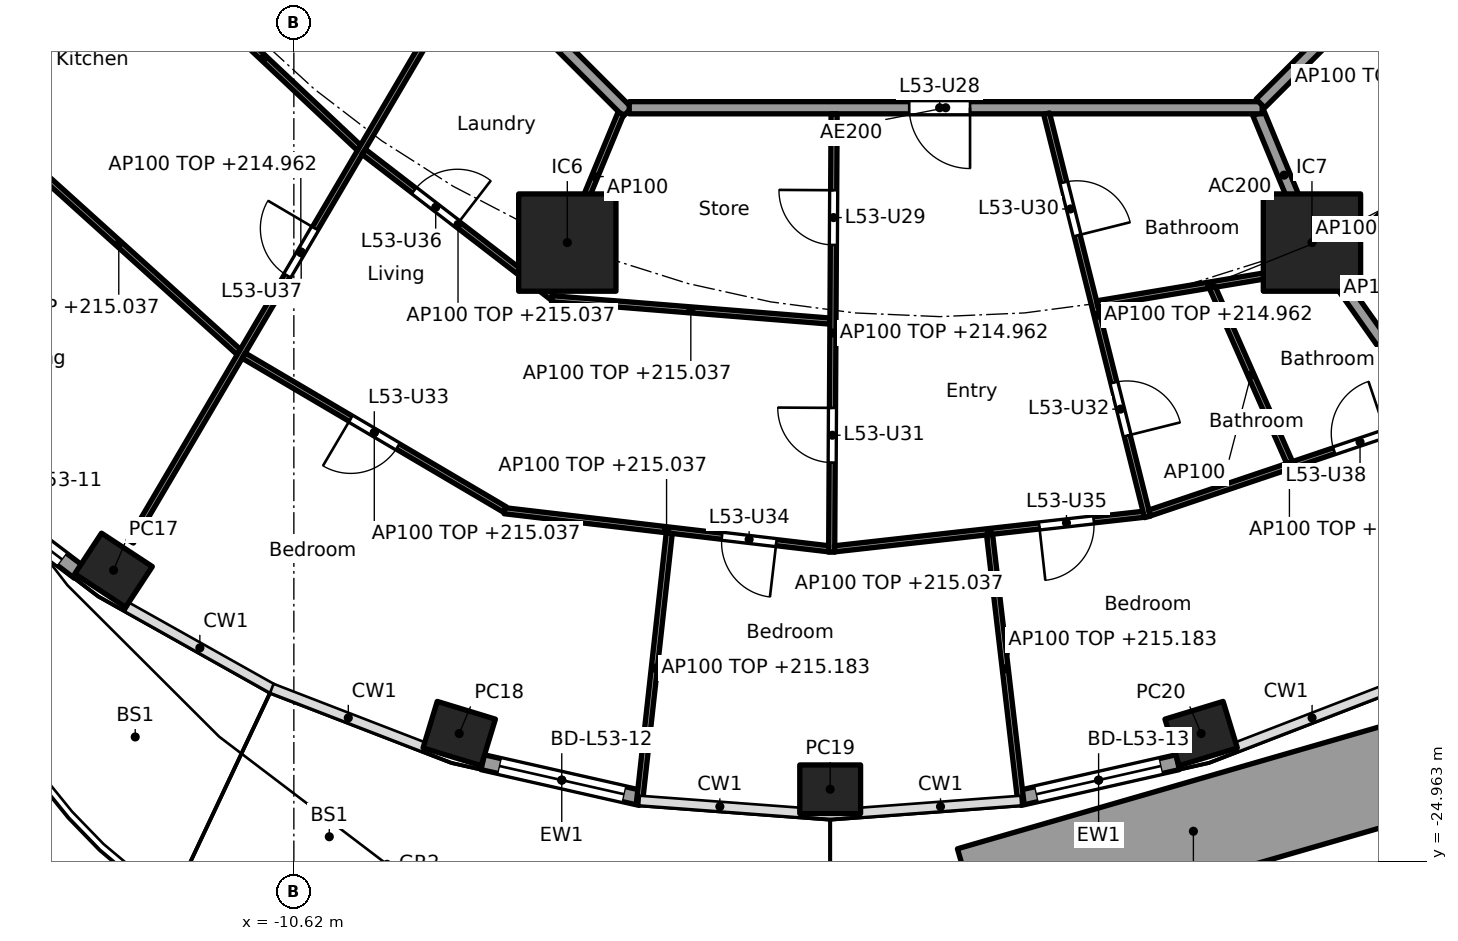
"""IFC4 building model, lengths in metres.
Left out: names, types, materials, properties, quantities, classifications, styles, units other than length and angle.
Written with IfcOpenShell. Run it as: python <this file> out.ifc"""

import sys

from ifc_helpers import new_model, si_unit, direction, frame, frame_2d, origin, origin_2d, place, context, subcontext, project, spatial, rectangle, hollow_rectangle, extrude, element, fill, save


model = new_model("IFC4")
c1 = context("Model", 3, precision=1e-05, world=origin(), true_north=direction((0.0, 1.0)))
c2 = subcontext(c1, "Body", "Model", "MODEL_VIEW")
j1 = project(units=[si_unit("LENGTHUNIT", "METRE"), si_unit("PLANEANGLEUNIT", "RADIAN")], contexts=[c1])
p1 = place(None, origin())
s1 = spatial("IfcSite", under=j1, at=p1, CompositionType="ELEMENT")
p2 = place(p1, origin())
s2 = spatial("IfcBuilding", under=s1, at=p2, CompositionType="ELEMENT")
p3 = place(p2, frame((0.0, 0.0, 212.2)))
s3 = spatial("IfcBuildingStorey", under=s2, at=p3, CompositionType="ELEMENT", Elevation=212.2)
for number, where, z_axis, x_axis in (
    (1, (-13.585, -20.17, -0.26), (0.0, 0.0, 1.0), (0.836, -0.549, 0.0)),
    (2, (-7.9, -22.856, -0.26), (0.0, 0.0, 1.0), (0.957, -0.292, 0.0)),
    (3, (-1.8, -23.772, -0.26), (0.0, 0.0, 1.0), (1.0, 0.0, 0.0)),
    (4, (4.3, -22.856, -0.26), (0.0, 0.0, 1.0), (0.957, 0.292, 0.0)),
):
    element("IfcColumn", number, at=place(p3, frame(where, z_axis=z_axis, x_axis=x_axis)), inside=s3, PredefinedType="COLUMN", context=c2, shape_type="SweptSolid", body=[
        extrude(hollow_rectangle(XDim=1.0, YDim=0.8, WallThickness=0.032, at=origin_2d()), origin(), (0.0, 0.0, 1.0), 3.96),
    ])
for number, where, z_axis, x_axis in (
    (5, (-6.123, -14.782, 0.0), (0.0, 0.0, 1.0), (1.0, 0.0, 0.0)),
    (6, (6.123, -14.782, 0.0), (0.0, 0.0, 1.0), (1.0, 0.0, 0.0)),
):
    element("IfcColumn", number, at=place(p3, frame(where, z_axis=z_axis, x_axis=x_axis)), inside=s3, PredefinedType="COLUMN", context=c2, shape_type="SweptSolid", body=[
        extrude(rectangle(XDim=1.6, YDim=1.6, at=origin_2d()), origin(), (0.0, 0.0, 1.0), 3.7),
    ])
p4 = place(p3, frame((-14.157, -20.201, 0.0), z_axis=(0.0, 0.0, 1.0), x_axis=(-0.795990084031, 0.60530966135, 0.0)))
e7 = element("IfcWall", 7, at=p4, inside=s3, PredefinedType="SOLIDWALL", context=c2, shape_type="SweptSolid", body=[
    extrude(rectangle(XDim=2.789, YDim=0.25, at=frame_2d((1.394, 0.0))), origin(), (0.0, 0.0, 1.0), 3.44),
])
p5 = place(p4, frame((0.344, 0.0, 0.0)))
e8 = element("IfcOpeningElement", 8, at=p5, cuts=e7, PredefinedType="OPENING", context=c2, shape_type="SweptSolid", body=[
    extrude(rectangle(XDim=2.1, YDim=2.4, at=frame_2d((1.05, 1.2))), frame((0.0, 0.135, 0.0), z_axis=(0.0, -1.0, 0.0), x_axis=(1.0, 0.0, 0.0)), (0.0, 0.0, 1.0), 0.27),
])
p6 = place(p3, frame((-4.914, -23.916, 0.0), z_axis=(0.0, 0.0, 1.0), x_axis=(-0.975324089124, 0.220777990694, 0.0)))
e9 = element("IfcWall", 9, at=p6, inside=s3, PredefinedType="SOLIDWALL", context=c2, shape_type="SweptSolid", body=[
    extrude(rectangle(XDim=2.666, YDim=0.25, at=frame_2d((1.333, 0.0))), origin(), (0.0, 0.0, 1.0), 3.44),
])
p7 = place(p6, frame((0.283, 0.0, 0.0)))
e10 = element("IfcOpeningElement", 10, at=p7, cuts=e9, PredefinedType="OPENING", context=c2, shape_type="SweptSolid", body=[
    extrude(rectangle(XDim=2.1, YDim=2.4, at=frame_2d((1.05, 1.2))), frame((0.0, 0.135, 0.0), z_axis=(0.0, -1.0, 0.0), x_axis=(1.0, 0.0, 0.0)), (0.0, 0.0, 1.0), 0.27),
])
p8 = place(p3, frame((3.915, -23.327, 0.0), z_axis=(0.0, 0.0, 1.0), x_axis=(-0.975324089124, -0.220777990694, 0.0)))
e11 = element("IfcWall", 11, at=p8, inside=s3, PredefinedType="SOLIDWALL", context=c2, shape_type="SweptSolid", body=[
    extrude(rectangle(XDim=2.666, YDim=0.25, at=frame_2d((1.333, 0.0))), origin(), (0.0, 0.0, 1.0), 3.44),
])
p9 = place(p8, frame((0.283, 0.0, 0.0)))
e12 = element("IfcOpeningElement", 12, at=p9, cuts=e11, PredefinedType="OPENING", context=c2, shape_type="SweptSolid", body=[
    extrude(rectangle(XDim=2.1, YDim=2.4, at=frame_2d((1.05, 1.2))), frame((0.0, 0.135, 0.0), z_axis=(0.0, -1.0, 0.0), x_axis=(1.0, 0.0, 0.0)), (0.0, 0.0, 1.0), 0.27),
])
p10 = place(p3, frame((0.515, -25.52, 0.0), z_axis=(0.0, 0.0, 1.0), x_axis=(0.960695754533, 0.277603435177, 0.0)))
e13 = element("IfcWall", 13, at=p10, inside=s3, PredefinedType="SOLIDWALL", context=c2, shape_type="SweptSolid", body=[
    extrude(rectangle(XDim=7.615, YDim=1.6, at=frame_2d((3.808, 0.0))), origin(), (0.0, 0.0, 1.0), 1.1),
])
p11 = place(p3, frame((12.567, -25.541, 0.0), z_axis=(0.0, 0.0, 1.0), x_axis=(-0.975296134704, -0.22090144778, 0.0)))
e14 = element("IfcWall", 14, at=p11, inside=s3, PredefinedType="SOLIDWALL", context=c2, shape_type="SweptSolid", body=[
    extrude(rectangle(XDim=9.019, YDim=1.6, at=frame_2d((4.509, 0.0))), origin(), (0.0, 0.0, 1.0), 1.1),
])
p12 = place(p3, frame((5.243, -12.657, 0.0), z_axis=(0.0, 0.0, 1.0), x_axis=(0.382691608661, -0.923876145736, 0.0)))
e15 = element("IfcWall", 15, at=p12, inside=s3, PredefinedType="PARTITIONING", context=c2, shape_type="SweptSolid", body=[
    extrude(rectangle(XDim=2.2, YDim=0.2, at=frame_2d((1.1, 0.0))), origin(), (0.0, 0.0, 1.0), 3.44),
])
p13 = place(p3, frame((6.152, -14.823, 0.0), z_axis=(0.0, 0.0, 1.0), x_axis=(0.576994695158, -0.816747893637, 0.0)))
e16 = element("IfcWall", 16, at=p13, inside=s3, PredefinedType="PARTITIONING", context=c2, shape_type="SweptSolid", body=[
    extrude(rectangle(XDim=6.03, YDim=0.2, at=frame_2d((3.015, 0.0))), origin(), (0.0, 0.0, 1.0), 2.837),
])
p14 = place(p3, frame((-12.635, -5.134, 0.0), z_axis=(0.0, 0.0, 1.0), x_axis=(0.707106781187, -0.707106781187, 0.0)))
e17 = element("IfcWall", 17, at=p14, inside=s3, PredefinedType="PARTITIONING", context=c2, shape_type="SweptSolid", body=[
    extrude(rectangle(XDim=10.609, YDim=0.2, at=frame_2d((5.305, 0.0))), origin(), (0.0, 0.0, 1.0), 3.44),
])
p15 = place(p3, frame((-5.104, -12.565, 0.0), z_axis=(0.0, 0.0, 1.0), x_axis=(1.0, 0.0, 0.0)))
e18 = element("IfcWall", 18, at=p15, inside=s3, PredefinedType="PARTITIONING", context=c2, shape_type="SweptSolid", body=[
    extrude(rectangle(XDim=10.409, YDim=0.2, at=frame_2d((5.205, 0.0))), origin(), (0.0, 0.0, 1.0), 3.44),
])
p16 = place(p15, frame((4.604, 0.0, 0.0)))
e19 = element("IfcOpeningElement", 19, at=p16, cuts=e18, PredefinedType="OPENING", context=c2, shape_type="SweptSolid", body=[
    extrude(rectangle(XDim=1.0, YDim=2.1, at=frame_2d((0.5, 1.05))), frame((0.0, 0.11, 0.0), z_axis=(0.0, -1.0, 0.0), x_axis=(1.0, 0.0, 0.0)), (0.0, 0.0, 1.0), 0.22),
])
p17 = place(p3, frame((5.275, -12.494, 0.0), z_axis=(0.0, 0.0, 1.0), x_axis=(0.707106781187, 0.707106781187, 0.0)))
e20 = element("IfcWall", 20, at=p17, inside=s3, PredefinedType="PARTITIONING", context=c2, shape_type="SweptSolid", body=[
    extrude(rectangle(XDim=10.409, YDim=0.2, at=frame_2d((5.205, 0.0))), origin(), (0.0, 0.0, 1.0), 3.44),
])
p18 = place(p3, frame((-12.688, -10.27, 0.0), z_axis=(0.0, 0.0, 1.0), x_axis=(0.728268142903, -0.685292282192, 0.0)))
e21 = element("IfcWall", 21, at=p18, inside=s3, PredefinedType="PARTITIONING", context=c2, shape_type="SweptSolid", body=[
    extrude(rectangle(XDim=4.312, YDim=0.1, at=frame_2d((2.156, 0.0))), origin(), (0.0, 0.0, 1.0), 2.837),
])
p19 = place(p3, frame((-15.474, -13.019, 0.0), z_axis=(0.0, 0.0, 1.0), x_axis=(0.742348572616, -0.670013878017, 0.0)))
e22 = element("IfcWall", 22, at=p19, inside=s3, PredefinedType="PARTITIONING", context=c2, shape_type="SweptSolid", body=[
    extrude(rectangle(XDim=5.319, YDim=0.1, at=frame_2d((2.66, 0.0))), origin(), (0.0, 0.0, 1.0), 2.837),
])
p20 = place(p3, frame((-7.709, -10.198, 0.0), z_axis=(0.0, 0.0, 1.0), x_axis=(-0.507355901053, -0.8617366127, 0.0)))
e23 = element("IfcWall", 23, at=p20, inside=s3, PredefinedType="PARTITIONING", context=c2, shape_type="SweptSolid", body=[
    extrude(rectangle(XDim=11.025, YDim=0.1, at=frame_2d((5.512, 0.0))), origin(), (0.0, 0.0, 1.0), 2.762),
])
p21 = place(p20, frame((5.05, 0.0, 0.0)))
e24 = element("IfcOpeningElement", 24, at=p21, cuts=e23, PredefinedType="OPENING", context=c2, shape_type="SweptSolid", body=[
    extrude(rectangle(XDim=0.9, YDim=2.1, at=frame_2d((0.45, 1.05))), frame((0.0, 0.06, 0.0), z_axis=(0.0, -1.0, 0.0), x_axis=(1.0, 0.0, 0.0)), (0.0, 0.0, 1.0), 0.12),
])
p22 = place(p3, frame((-9.471, -13.289, 0.0), z_axis=(0.0, 0.0, 1.0), x_axis=(0.7922205419, -0.61023488346, 0.0)))
e25 = element("IfcWall", 25, at=p22, inside=s3, PredefinedType="PARTITIONING", context=c2, shape_type="SweptSolid", body=[
    extrude(rectangle(XDim=3.916, YDim=0.1, at=frame_2d((1.958, 0.0))), origin(), (0.0, 0.0, 1.0), 2.837),
])
p23 = place(p22, frame((1.045, 0.0, 0.0)))
e26 = element("IfcOpeningElement", 26, at=p23, cuts=e25, PredefinedType="OPENING", context=c2, shape_type="SweptSolid", body=[
    extrude(rectangle(XDim=0.9, YDim=2.1, at=frame_2d((0.45, 1.05))), frame((0.0, 0.06, 0.0), z_axis=(0.0, -1.0, 0.0), x_axis=(1.0, 0.0, 0.0)), (0.0, 0.0, 1.0), 0.12),
])
p24 = place(p3, frame((-11.445, -16.641, 0.0), z_axis=(0.0, 0.0, 1.0), x_axis=(0.861562560957, -0.507651409489, 0.0)))
e27 = element("IfcWall", 27, at=p24, inside=s3, PredefinedType="PARTITIONING", context=c2, shape_type="SweptSolid", body=[
    extrude(rectangle(XDim=4.985, YDim=0.1, at=frame_2d((2.492, 0.0))), origin(), (0.0, 0.0, 1.0), 2.837),
])
p25 = place(p24, frame((2.042, 0.0, 0.0)))
e28 = element("IfcOpeningElement", 28, at=p25, cuts=e27, PredefinedType="OPENING", context=c2, shape_type="SweptSolid", body=[
    extrude(rectangle(XDim=0.9, YDim=2.1, at=frame_2d((0.45, 1.05))), frame((0.0, 0.06, 0.0), z_axis=(0.0, -1.0, 0.0), x_axis=(1.0, 0.0, 0.0)), (0.0, 0.0, 1.0), 0.12),
])
p26 = place(p3, frame((-5.243, -12.657, 0.0), z_axis=(0.0, 0.0, 1.0), x_axis=(-0.382719158442, -0.923864733477, 0.0)))
e29 = element("IfcWall", 29, at=p26, inside=s3, PredefinedType="PARTITIONING", context=c2, shape_type="SweptSolid", body=[
    extrude(rectangle(XDim=2.25, YDim=0.1, at=frame_2d((1.125, 0.0))), origin(), (0.0, 0.0, 1.0), 3.44),
])
p27 = place(p3, frame((-6.379, -15.705, 0.0), z_axis=(0.0, 0.0, 1.0), x_axis=(0.996786462227, -0.080104611105, 0.0)))
e30 = element("IfcWall", 30, at=p27, inside=s3, PredefinedType="PARTITIONING", context=c2, shape_type="SweptSolid", body=[
    extrude(rectangle(XDim=4.59, YDim=0.1, at=frame_2d((2.295, 0.0))), origin(), (0.0, 0.0, 1.0), 2.837),
])
p28 = place(p3, frame((-7.156, -19.191, 0.0), z_axis=(0.0, 0.0, 1.0), x_axis=(0.993172627718, -0.116653896424, 0.0)))
e31 = element("IfcWall", 31, at=p28, inside=s3, PredefinedType="PARTITIONING", context=c2, shape_type="SweptSolid", body=[
    extrude(rectangle(XDim=5.368, YDim=0.1, at=frame_2d((2.684, 0.0))), origin(), (0.0, 0.0, 1.0), 2.837),
])
p29 = place(p28, frame((3.601, 0.0, 0.0)))
e32 = element("IfcOpeningElement", 32, at=p29, cuts=e31, PredefinedType="OPENING", context=c2, shape_type="SweptSolid", body=[
    extrude(rectangle(XDim=0.9, YDim=2.1, at=frame_2d((0.45, 1.05))), frame((0.0, 0.06, 0.0), z_axis=(0.0, -1.0, 0.0), x_axis=(1.0, 0.0, 0.0)), (0.0, 0.0, 1.0), 0.12),
])
p30 = place(p3, frame((-4.447, -19.56, 0.0), z_axis=(0.0, 0.0, 1.0), x_axis=(-0.109897425445, -0.993942933915, 0.0)))
e33 = element("IfcWall", 33, at=p30, inside=s3, PredefinedType="PARTITIONING", context=c2, shape_type="SweptSolid", body=[
    extrude(rectangle(XDim=4.465, YDim=0.1, at=frame_2d((2.233, 0.0))), origin(), (0.0, 0.0, 1.0), 2.983),
])
p31 = place(p3, frame((-1.735, -12.665, 0.0), z_axis=(0.0, 0.0, 1.0), x_axis=(-0.005554152823, -0.999984575574, 0.0)))
e34 = element("IfcWall", 34, at=p31, inside=s3, PredefinedType="PARTITIONING", context=c2, shape_type="SweptSolid", body=[
    extrude(rectangle(XDim=7.209, YDim=0.1, at=frame_2d((3.604, 0.0))), origin(), (0.0, 0.0, 1.0), 2.762),
])
p32 = place(p31, frame((1.256, 0.0, 0.0)))
e35 = element("IfcOpeningElement", 35, at=p32, cuts=e34, PredefinedType="OPENING", context=c2, shape_type="SweptSolid", body=[
    extrude(rectangle(XDim=0.9, YDim=2.1, at=frame_2d((0.45, 1.05))), frame((0.0, 0.06, 0.0), z_axis=(0.0, -1.0, 0.0), x_axis=(1.0, 0.0, 0.0)), (0.0, 0.0, 1.0), 0.12),
])
p33 = place(p31, frame((4.836, 0.0, 0.0)))
e36 = element("IfcOpeningElement", 36, at=p33, cuts=e34, PredefinedType="OPENING", context=c2, shape_type="SweptSolid", body=[
    extrude(rectangle(XDim=0.9, YDim=2.1, at=frame_2d((0.45, 1.05))), frame((0.0, 0.06, 0.0), z_axis=(0.0, -1.0, 0.0), x_axis=(1.0, 0.0, 0.0)), (0.0, 0.0, 1.0), 0.12),
])
p34 = place(p3, frame((-1.726, -19.818, 0.0), z_axis=(0.0, 0.0, 1.0), x_axis=(0.99381893047, 0.111013212902, 0.0)))
e37 = element("IfcWall", 37, at=p34, inside=s3, PredefinedType="PARTITIONING", context=c2, shape_type="SweptSolid", body=[
    extrude(rectangle(XDim=5.113, YDim=0.1, at=frame_2d((2.557, 0.0))), origin(), (0.0, 0.0, 1.0), 2.837),
])
p35 = place(p34, frame((3.385, 0.0, 0.0)))
e38 = element("IfcOpeningElement", 38, at=p35, cuts=e37, PredefinedType="OPENING", context=c2, shape_type="SweptSolid", body=[
    extrude(rectangle(XDim=0.9, YDim=2.1, at=frame_2d((0.45, 1.05))), frame((0.0, 0.06, 0.0), z_axis=(0.0, -1.0, 0.0), x_axis=(1.0, 0.0, 0.0)), (0.0, 0.0, 1.0), 0.12),
])
p36 = place(p3, frame((0.821, -19.584, 0.0), z_axis=(0.0, 0.0, 1.0), x_axis=(0.116120946841, -0.993235080786, 0.0)))
e39 = element("IfcWall", 39, at=p36, inside=s3, PredefinedType="PARTITIONING", context=c2, shape_type="SweptSolid", body=[
    extrude(rectangle(XDim=4.445, YDim=0.1, at=frame_2d((2.222, 0.0))), origin(), (0.0, 0.0, 1.0), 2.983),
])
p37 = place(p3, frame((1.759, -12.662, 0.0), z_axis=(0.0, 0.0, 1.0), x_axis=(0.242653275363, -0.970113079984, 0.0)))
e40 = element("IfcWall", 40, at=p37, inside=s3, PredefinedType="PARTITIONING", context=c2, shape_type="SweptSolid", body=[
    extrude(rectangle(XDim=6.836, YDim=0.1, at=frame_2d((3.418, 0.0))), origin(), (0.0, 0.0, 1.0), 2.762),
])
p38 = place(p37, frame((1.166, 0.0, 0.0)))
e41 = element("IfcOpeningElement", 41, at=p38, cuts=e40, PredefinedType="OPENING", context=c2, shape_type="SweptSolid", body=[
    extrude(rectangle(XDim=0.9, YDim=2.1, at=frame_2d((0.45, 1.05))), frame((0.0, 0.06, 0.0), z_axis=(0.0, -1.0, 0.0), x_axis=(1.0, 0.0, 0.0)), (0.0, 0.0, 1.0), 0.12),
])
p39 = place(p37, frame((4.559, 0.0, 0.0)))
e42 = element("IfcOpeningElement", 42, at=p39, cuts=e40, PredefinedType="OPENING", context=c2, shape_type="SweptSolid", body=[
    extrude(rectangle(XDim=0.9, YDim=2.1, at=frame_2d((0.45, 1.05))), frame((0.0, 0.06, 0.0), z_axis=(0.0, -1.0, 0.0), x_axis=(1.0, 0.0, 0.0)), (0.0, 0.0, 1.0), 0.12),
])
p40 = place(p3, frame((2.593, -15.789, 0.0), z_axis=(0.0, 0.0, 1.0), x_axis=(0.986385117656, 0.164451815639, 0.0)))
e43 = element("IfcWall", 43, at=p40, inside=s3, PredefinedType="PARTITIONING", context=c2, shape_type="SweptSolid", body=[
    extrude(rectangle(XDim=3.747, YDim=0.1, at=frame_2d((1.874, 0.0))), origin(), (0.0, 0.0, 1.0), 2.837),
])
p41 = place(p3, frame((3.453, -19.229, 0.0), z_axis=(0.0, 0.0, 1.0), x_axis=(0.947565610716, 0.31956128268, 0.0)))
e44 = element("IfcWall", 44, at=p41, inside=s3, PredefinedType="PARTITIONING", context=c2, shape_type="SweptSolid", body=[
    extrude(rectangle(XDim=4.853, YDim=0.1, at=frame_2d((2.426, 0.0))), origin(), (0.0, 0.0, 1.0), 2.837),
])
p42 = place(p41, frame((3.202, 0.0, 0.0)))
e45 = element("IfcOpeningElement", 45, at=p42, cuts=e44, PredefinedType="OPENING", context=c2, shape_type="SweptSolid", body=[
    extrude(rectangle(XDim=0.9, YDim=2.1, at=frame_2d((0.45, 1.05))), frame((0.0, 0.06, 0.0), z_axis=(0.0, -1.0, 0.0), x_axis=(1.0, 0.0, 0.0)), (0.0, 0.0, 1.0), 0.12),
])
p43 = place(p3, frame((4.485, -15.522, 0.0), z_axis=(0.0, 0.0, 1.0), x_axis=(0.40391918208, -0.914794673327, 0.0)))
e46 = element("IfcWall", 46, at=p43, inside=s3, PredefinedType="PARTITIONING", context=c2, shape_type="SweptSolid", body=[
    extrude(rectangle(XDim=3.146, YDim=0.1, at=frame_2d((1.573, 0.0))), origin(), (0.0, 0.0, 1.0), 3.44),
])
p44 = place(p3, frame((6.461, -15.088, 0.0), z_axis=(0.0, 0.0, 1.0), x_axis=(0.73461579427, 0.678483334217, 0.0)))
e47 = element("IfcWall", 47, at=p44, inside=s3, PredefinedType="PARTITIONING", context=c2, shape_type="SweptSolid", body=[
    extrude(rectangle(XDim=5.837, YDim=0.1, at=frame_2d((2.918, 0.0))), origin(), (0.0, 0.0, 1.0), 2.837),
])
p45 = place(p5, origin())
e48 = element("IfcDoor", 48, at=p45, inside=s3, OperationType="SLIDING_TO_LEFT", PredefinedType="DOOR", context=c2, shape_type="SweptSolid", body=[
    extrude(rectangle(XDim=2.1, YDim=2.4, at=frame_2d((1.05, 1.2))), frame((0.0, 0.025, 0.0), z_axis=(0.0, -1.0, 0.0), x_axis=(1.0, 0.0, 0.0)), (0.0, 0.0, 1.0), 0.05),
])
fill(e8, e48)
p46 = place(p7, origin())
e49 = element("IfcDoor", 49, at=p46, inside=s3, OperationType="SLIDING_TO_LEFT", PredefinedType="DOOR", context=c2, shape_type="SweptSolid", body=[
    extrude(rectangle(XDim=2.1, YDim=2.4, at=frame_2d((1.05, 1.2))), frame((0.0, 0.025, 0.0), z_axis=(0.0, -1.0, 0.0), x_axis=(1.0, 0.0, 0.0)), (0.0, 0.0, 1.0), 0.05),
])
fill(e10, e49)
p47 = place(p9, origin())
e50 = element("IfcDoor", 50, at=p47, inside=s3, OperationType="SLIDING_TO_LEFT", PredefinedType="DOOR", context=c2, shape_type="SweptSolid", body=[
    extrude(rectangle(XDim=2.1, YDim=2.4, at=frame_2d((1.05, 1.2))), frame((0.0, 0.025, 0.0), z_axis=(0.0, -1.0, 0.0), x_axis=(1.0, 0.0, 0.0)), (0.0, 0.0, 1.0), 0.05),
])
fill(e12, e50)
p48 = place(p16, frame((1.0, 0.0, 0.0), x_axis=(-1.0, 0.0, 0.0)))
e51 = element("IfcDoor", 51, at=p48, inside=s3, OperationType="SINGLE_SWING_LEFT", PredefinedType="DOOR", context=c2, shape_type="SweptSolid", body=[
    extrude(rectangle(XDim=1.0, YDim=2.1, at=frame_2d((0.5, 1.05))), frame((0.0, 0.025, 0.0), z_axis=(0.0, -1.0, 0.0), x_axis=(1.0, 0.0, 0.0)), (0.0, 0.0, 1.0), 0.05),
])
fill(e19, e51)
p49 = place(p32, frame((0.9, 0.0, 0.0), x_axis=(-1.0, 0.0, 0.0)))
e52 = element("IfcDoor", 52, at=p49, inside=s3, OperationType="SINGLE_SWING_RIGHT", PredefinedType="DOOR", context=c2, shape_type="SweptSolid", body=[
    extrude(rectangle(XDim=0.9, YDim=2.1, at=frame_2d((0.45, 1.05))), frame((0.0, 0.025, 0.0), z_axis=(0.0, -1.0, 0.0), x_axis=(1.0, 0.0, 0.0)), (0.0, 0.0, 1.0), 0.05),
])
fill(e35, e52)
p50 = place(p38, origin())
e53 = element("IfcDoor", 53, at=p50, inside=s3, OperationType="SINGLE_SWING_RIGHT", PredefinedType="DOOR", context=c2, shape_type="SweptSolid", body=[
    extrude(rectangle(XDim=0.9, YDim=2.1, at=frame_2d((0.45, 1.05))), frame((0.0, 0.025, 0.0), z_axis=(0.0, -1.0, 0.0), x_axis=(1.0, 0.0, 0.0)), (0.0, 0.0, 1.0), 0.05),
])
fill(e41, e53)
p51 = place(p33, frame((0.9, 0.0, 0.0), x_axis=(-1.0, 0.0, 0.0)))
e54 = element("IfcDoor", 54, at=p51, inside=s3, OperationType="SINGLE_SWING_RIGHT", PredefinedType="DOOR", context=c2, shape_type="SweptSolid", body=[
    extrude(rectangle(XDim=0.9, YDim=2.1, at=frame_2d((0.45, 1.05))), frame((0.0, 0.025, 0.0), z_axis=(0.0, -1.0, 0.0), x_axis=(1.0, 0.0, 0.0)), (0.0, 0.0, 1.0), 0.05),
])
fill(e36, e54)
p52 = place(p39, origin())
e55 = element("IfcDoor", 55, at=p52, inside=s3, OperationType="SINGLE_SWING_RIGHT", PredefinedType="DOOR", context=c2, shape_type="SweptSolid", body=[
    extrude(rectangle(XDim=0.9, YDim=2.1, at=frame_2d((0.45, 1.05))), frame((0.0, 0.025, 0.0), z_axis=(0.0, -1.0, 0.0), x_axis=(1.0, 0.0, 0.0)), (0.0, 0.0, 1.0), 0.05),
])
fill(e42, e55)
p53 = place(p25, frame((0.9, 0.0, 0.0), x_axis=(-1.0, 0.0, 0.0)))
e56 = element("IfcDoor", 56, at=p53, inside=s3, OperationType="SINGLE_SWING_RIGHT", PredefinedType="DOOR", context=c2, shape_type="SweptSolid", body=[
    extrude(rectangle(XDim=0.9, YDim=2.1, at=frame_2d((0.45, 1.05))), frame((0.0, 0.025, 0.0), z_axis=(0.0, -1.0, 0.0), x_axis=(1.0, 0.0, 0.0)), (0.0, 0.0, 1.0), 0.05),
])
fill(e28, e56)
p54 = place(p29, frame((0.9, 0.0, 0.0), x_axis=(-1.0, 0.0, 0.0)))
e57 = element("IfcDoor", 57, at=p54, inside=s3, OperationType="SINGLE_SWING_LEFT", PredefinedType="DOOR", context=c2, shape_type="SweptSolid", body=[
    extrude(rectangle(XDim=0.9, YDim=2.1, at=frame_2d((0.45, 1.05))), frame((0.0, 0.025, 0.0), z_axis=(0.0, -1.0, 0.0), x_axis=(1.0, 0.0, 0.0)), (0.0, 0.0, 1.0), 0.05),
])
fill(e32, e57)
p55 = place(p35, frame((0.9, 0.0, 0.0), x_axis=(-1.0, 0.0, 0.0)))
e58 = element("IfcDoor", 58, at=p55, inside=s3, OperationType="SINGLE_SWING_RIGHT", PredefinedType="DOOR", context=c2, shape_type="SweptSolid", body=[
    extrude(rectangle(XDim=0.9, YDim=2.1, at=frame_2d((0.45, 1.05))), frame((0.0, 0.025, 0.0), z_axis=(0.0, -1.0, 0.0), x_axis=(1.0, 0.0, 0.0)), (0.0, 0.0, 1.0), 0.05),
])
fill(e38, e58)
p56 = place(p23, origin())
e59 = element("IfcDoor", 59, at=p56, inside=s3, OperationType="SINGLE_SWING_RIGHT", PredefinedType="DOOR", context=c2, shape_type="SweptSolid", body=[
    extrude(rectangle(XDim=0.9, YDim=2.1, at=frame_2d((0.45, 1.05))), frame((0.0, 0.025, 0.0), z_axis=(0.0, -1.0, 0.0), x_axis=(1.0, 0.0, 0.0)), (0.0, 0.0, 1.0), 0.05),
])
fill(e26, e59)
p57 = place(p21, frame((0.9, 0.0, 0.0), x_axis=(-1.0, 0.0, 0.0)))
e60 = element("IfcDoor", 60, at=p57, inside=s3, OperationType="SINGLE_SWING_RIGHT", PredefinedType="DOOR", context=c2, shape_type="SweptSolid", body=[
    extrude(rectangle(XDim=0.9, YDim=2.1, at=frame_2d((0.45, 1.05))), frame((0.0, 0.025, 0.0), z_axis=(0.0, -1.0, 0.0), x_axis=(1.0, 0.0, 0.0)), (0.0, 0.0, 1.0), 0.05),
])
fill(e24, e60)
p58 = place(p42, origin())
e61 = element("IfcDoor", 61, at=p58, inside=s3, OperationType="SINGLE_SWING_RIGHT", PredefinedType="DOOR", context=c2, shape_type="SweptSolid", body=[
    extrude(rectangle(XDim=0.9, YDim=2.1, at=frame_2d((0.45, 1.05))), frame((0.0, 0.025, 0.0), z_axis=(0.0, -1.0, 0.0), x_axis=(1.0, 0.0, 0.0)), (0.0, 0.0, 1.0), 0.05),
])
fill(e45, e61)
save(model, sys.argv[1])
